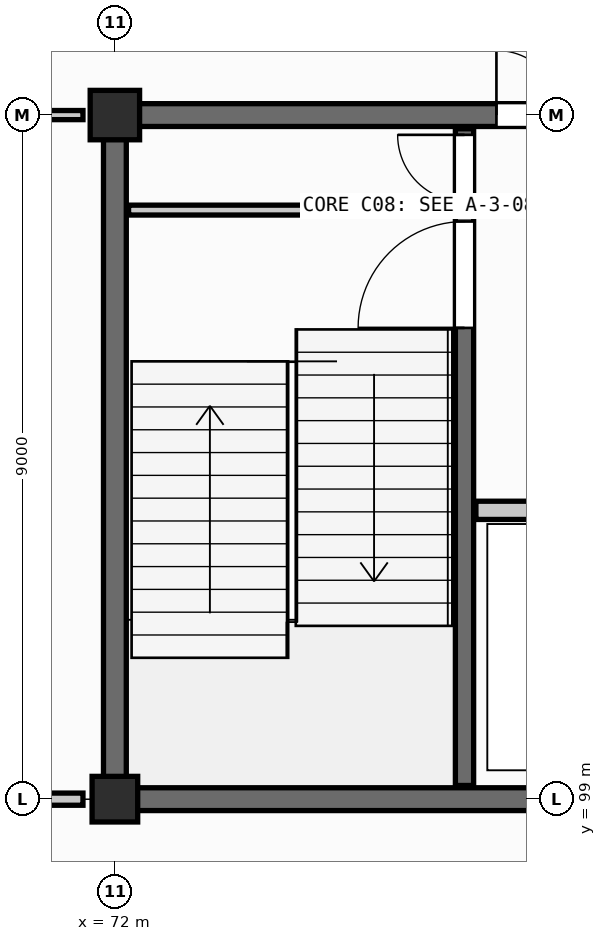
"""IFC4 building model, lengths in metres.
Left out: names, types, materials, properties, quantities, classifications, styles, units other than length and angle.
Written with IfcOpenShell. Run it as: python <this file> out.ifc"""

import sys

from ifc_helpers import new_model, si_unit, direction, frame, frame_2d, origin, origin_2d, place, context, subcontext, project, spatial, rectangle, extrude, element, fill, save


model = new_model("IFC4")
c1 = context("Model", 3, precision=1e-05, world=origin(), true_north=direction((0.0, 1.0)))
c2 = subcontext(c1, "Body", "Model", "MODEL_VIEW")
j1 = project(units=[si_unit("LENGTHUNIT", "METRE"), si_unit("PLANEANGLEUNIT", "RADIAN")], contexts=[c1])
p1 = place(None, origin())
s1 = spatial("IfcSite", under=j1, at=p1, CompositionType="ELEMENT")
p2 = place(p1, origin())
s2 = spatial("IfcBuilding", under=s1, at=p2, CompositionType="ELEMENT")
p3 = place(p2, frame((0.0, 0.0, 4.8)))
s3 = spatial("IfcBuildingStorey", under=s2, at=p3, CompositionType="ELEMENT", Elevation=4.8)
p4 = place(p3, frame((72.0, 99.0, 0.0), z_axis=(0.0, 0.0, 1.0), x_axis=(1.0, 0.0, 0.0)))
e1 = element("IfcColumn", 1, at=p4, inside=s3, PredefinedType="COLUMN", context=c2, shape_type="SweptSolid", body=[
    extrude(rectangle(XDim=0.6, YDim=0.6, at=origin_2d()), origin(), (0.0, 0.0, 1.0), 4.2),
])
p5 = place(p3, frame((72.0, 108.0, 0.0), z_axis=(0.0, 0.0, 1.0), x_axis=(1.0, 0.0, 0.0)))
e2 = element("IfcColumn", 2, at=p5, inside=s3, PredefinedType="COLUMN", context=c2, shape_type="SweptSolid", body=[
    extrude(rectangle(XDim=0.65, YDim=0.65, at=origin_2d()), origin(), (0.0, 0.0, 1.0), 4.2),
])
p6 = place(p3, frame((72.295, 99.0, 0.0), z_axis=(0.0, 0.0, 1.0), x_axis=(1.0, 0.0, 0.0)))
e3 = element("IfcWall", 3, at=p6, inside=s3, PredefinedType="SHEAR", context=c2, shape_type="SweptSolid", body=[
    extrude(rectangle(XDim=7.41, YDim=0.3, at=frame_2d((3.705, 0.0))), origin(), (0.0, 0.0, 1.0), 3.955),
])
p7 = place(p3, frame((72.32, 108.0, 0.0), z_axis=(0.0, 0.0, 1.0), x_axis=(1.0, 0.0, 0.0)))
e4 = element("IfcWall", 4, at=p7, inside=s3, PredefinedType="SHEAR", context=c2, shape_type="SweptSolid", body=[
    extrude(rectangle(XDim=7.36, YDim=0.3, at=frame_2d((3.68, 0.0))), origin(), (0.0, 0.0, 1.0), 3.955),
])
p8 = place(p7, frame((4.7, 0.0, 0.0)))
e5 = element("IfcOpeningElement", 5, at=p8, cuts=e4, PredefinedType="OPENING", context=c2, shape_type="SweptSolid", body=[
    extrude(rectangle(XDim=1.7, YDim=2.25, at=frame_2d((0.85, 1.125))), frame((0.0, 0.16, 0.0), z_axis=(0.0, -1.0, 0.0), x_axis=(1.0, 0.0, 0.0)), (0.0, 0.0, 1.0), 0.32),
])
p9 = place(p3, frame((72.0, 99.295, 0.0), z_axis=(0.0, 0.0, 1.0), x_axis=(0.0, 1.0, 0.0)))
e6 = element("IfcWall", 6, at=p9, inside=s3, PredefinedType="SHEAR", context=c2, shape_type="SweptSolid", body=[
    extrude(rectangle(XDim=8.385, YDim=0.3, at=frame_2d((4.192, 0.0))), origin(), (0.0, 0.0, 1.0), 3.955),
])
p10 = place(p3, frame((76.6, 99.18, 0.0), z_axis=(0.0, 0.0, 1.0), x_axis=(0.0, 1.0, 0.0)))
e7 = element("IfcWall", 7, at=p10, inside=s3, PredefinedType="SHEAR", context=c2, shape_type="SweptSolid", body=[
    extrude(rectangle(XDim=8.64, YDim=0.24, at=frame_2d((4.32, 0.0))), origin(), (0.0, 0.0, 1.0), 3.955),
])
p11 = place(p10, frame((6.02, 0.0, 0.0)))
e8 = element("IfcOpeningElement", 8, at=p11, cuts=e7, PredefinedType="OPENING", context=c2, shape_type="SweptSolid", body=[
    extrude(rectangle(XDim=1.4, YDim=2.2, at=frame_2d((0.7, 1.1))), frame((0.0, 0.13, 0.0), z_axis=(0.0, -1.0, 0.0), x_axis=(1.0, 0.0, 0.0)), (0.0, 0.0, 1.0), 0.26),
])
p12 = place(p10, frame((7.68, 0.0, 0.0)))
e9 = element("IfcOpeningElement", 9, at=p12, cuts=e7, PredefinedType="OPENING", context=c2, shape_type="SweptSolid", body=[
    extrude(rectangle(XDim=0.88, YDim=2.02, at=frame_2d((0.44, 1.01))), frame((0.0, 0.13, 0.0), z_axis=(0.0, -1.0, 0.0), x_axis=(1.0, 0.0, 0.0)), (0.0, 0.0, 1.0), 0.26),
])
p13 = place(p3, frame((72.18, 106.75, 0.0), z_axis=(0.0, 0.0, 1.0), x_axis=(1.0, 0.0, 0.0)))
e10 = element("IfcWall", 10, at=p13, inside=s3, PredefinedType="PARTITIONING", context=c2, shape_type="SweptSolid", body=[
    extrude(rectangle(XDim=4.28, YDim=0.13, at=frame_2d((2.14, 0.0))), origin(), (0.0, 0.0, 1.0), 3.305),
])
p14 = place(p3, frame((76.75, 102.8, 0.0), z_axis=(0.0, 0.0, 1.0), x_axis=(1.0, 0.0, 0.0)))
e11 = element("IfcWall", 11, at=p14, inside=s3, PredefinedType="SHEAR", context=c2, shape_type="SweptSolid", body=[
    extrude(rectangle(XDim=3.07, YDim=0.24, at=frame_2d((1.535, 0.0))), origin(), (0.0, 0.0, 1.0), 3.305),
])
p15 = place(p14, frame((1.035, 0.0, 0.0)))
e12 = element("IfcOpeningElement", 12, at=p15, cuts=e11, PredefinedType="OPENING", context=c2, shape_type="SweptSolid", body=[
    extrude(rectangle(XDim=1.0, YDim=2.15, at=frame_2d((0.5, 1.075))), frame((0.0, 0.13, 0.0), z_axis=(0.0, -1.0, 0.0), x_axis=(1.0, 0.0, 0.0)), (0.0, 0.0, 1.0), 0.26),
])
p16 = place(p3, frame((64.82, 99.0, 0.0), z_axis=(0.0, 0.0, 1.0), x_axis=(1.0, 0.0, 0.0)))
e13 = element("IfcWall", 13, at=p16, inside=s3, PredefinedType="PARTITIONING", context=c2, shape_type="SweptSolid", body=[
    extrude(rectangle(XDim=6.76, YDim=0.16, at=frame_2d((3.38, 0.0))), origin(), (0.0, 0.0, 1.0), 3.05),
])
p17 = place(p16, frame((2.79, 0.0, 0.0)))
e14 = element("IfcOpeningElement", 14, at=p17, cuts=e13, PredefinedType="OPENING", context=c2, shape_type="SweptSolid", body=[
    extrude(rectangle(XDim=1.18, YDim=2.2, at=frame_2d((0.59, 1.1))), frame((0.0, 0.09, 0.0), z_axis=(0.0, -1.0, 0.0), x_axis=(1.0, 0.0, 0.0)), (0.0, 0.0, 1.0), 0.18),
])
p18 = place(p3, frame((64.82, 108.0, 0.0), z_axis=(0.0, 0.0, 1.0), x_axis=(1.0, 0.0, 0.0)))
e15 = element("IfcWall", 15, at=p18, inside=s3, PredefinedType="PARTITIONING", context=c2, shape_type="SweptSolid", body=[
    extrude(rectangle(XDim=6.76, YDim=0.12, at=frame_2d((3.38, 0.0))), origin(), (0.0, 0.0, 1.0), 3.05),
])
p19 = place(p18, frame((2.505, 0.0, 0.0)))
e16 = element("IfcOpeningElement", 16, at=p19, cuts=e15, PredefinedType="OPENING", context=c2, shape_type="SweptSolid", body=[
    extrude(rectangle(XDim=1.75, YDim=2.22, at=frame_2d((0.875, 1.11))), frame((0.0, 0.07, 0.0), z_axis=(0.0, -1.0, 0.0), x_axis=(1.0, 0.0, 0.0)), (0.0, 0.0, 1.0), 0.14),
])
p20 = place(p11, origin())
e17 = element("IfcDoor", 17, at=p20, inside=s3, OperationType="SINGLE_SWING_LEFT", PredefinedType="DOOR", context=c2, shape_type="SweptSolid", body=[
    extrude(rectangle(XDim=1.4, YDim=2.2, at=frame_2d((0.7, 1.1))), frame((0.0, 0.025, 0.0), z_axis=(0.0, -1.0, 0.0), x_axis=(1.0, 0.0, 0.0)), (0.0, 0.0, 1.0), 0.05),
])
fill(e8, e17)
p21 = place(p12, origin())
e18 = element("IfcDoor", 18, at=p21, inside=s3, OperationType="SINGLE_SWING_RIGHT", PredefinedType="DOOR", context=c2, shape_type="SweptSolid", body=[
    extrude(rectangle(XDim=0.88, YDim=2.02, at=frame_2d((0.44, 1.01))), frame((0.0, 0.025, 0.0), z_axis=(0.0, -1.0, 0.0), x_axis=(1.0, 0.0, 0.0)), (0.0, 0.0, 1.0), 0.05),
])
fill(e9, e18)
p22 = place(p8, origin())
e19 = element("IfcDoor", 19, at=p22, inside=s3, OperationType="DOUBLE_DOOR_SINGLE_SWING", PredefinedType="DOOR", context=c2, shape_type="SweptSolid", body=[
    extrude(rectangle(XDim=1.7, YDim=2.25, at=frame_2d((0.85, 1.125))), frame((0.0, 0.025, 0.0), z_axis=(0.0, -1.0, 0.0), x_axis=(1.0, 0.0, 0.0)), (0.0, 0.0, 1.0), 0.05),
])
fill(e5, e19)
save(model, sys.argv[1])
